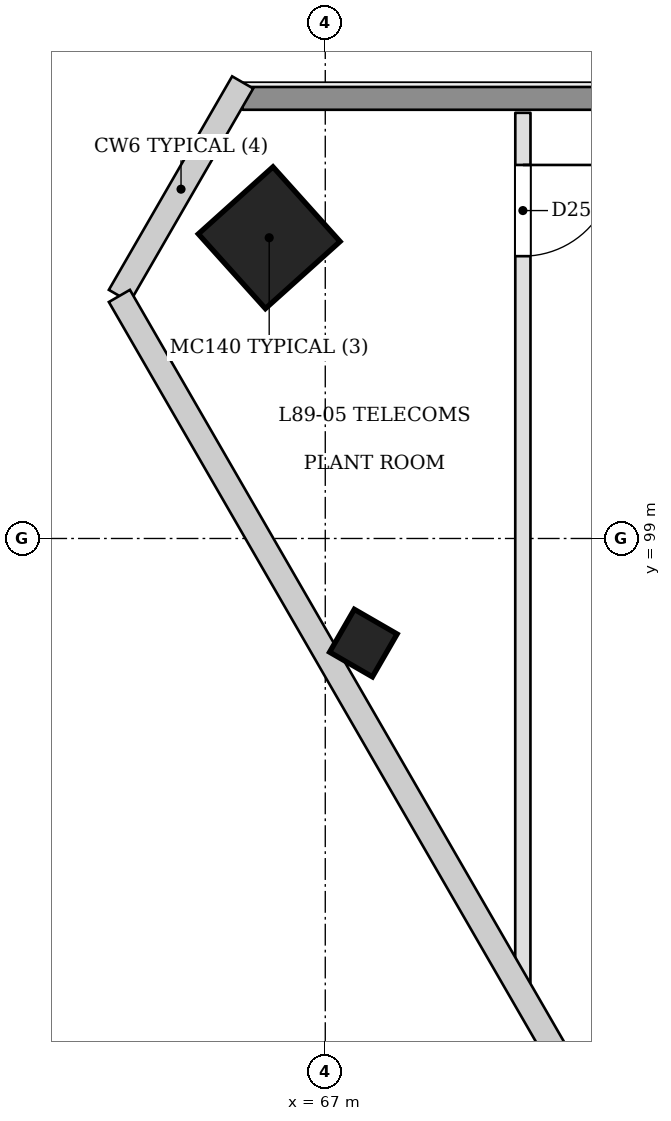
"""IFC4 building model, lengths in metres.
Left out: names, types, materials, properties, quantities, classifications, styles, units other than length and angle.
Written with IfcOpenShell. Run it as: python <this file> out.ifc"""

import sys

from ifc_helpers import new_model, si_unit, direction, frame, frame_2d, origin, origin_2d, place, context, subcontext, project, spatial, rectangle, extrude, element, fill, save


model = new_model("IFC4")
c1 = context("Model", 3, precision=1e-05, world=origin(), true_north=direction((0.0, 1.0)))
c2 = subcontext(c1, "Body", "Model", "MODEL_VIEW")
j1 = project(units=[si_unit("LENGTHUNIT", "METRE"), si_unit("PLANEANGLEUNIT", "RADIAN")], contexts=[c1])
p1 = place(None, origin())
s1 = spatial("IfcSite", under=j1, at=p1, CompositionType="ELEMENT")
p2 = place(p1, origin())
s2 = spatial("IfcBuilding", under=s1, at=p2, CompositionType="ELEMENT")
p3 = place(p2, frame((0.0, 0.0, 343.0)))
s3 = spatial("IfcBuildingStorey", under=s2, at=p3, CompositionType="ELEMENT", Elevation=343.0)
p4 = place(p3, frame((66.228, 102.945, 0.0), z_axis=(0.028354513336, 0.00929656175, 0.99955469861), x_axis=(-0.866606398712, 0.498593533473, 0.019945879045)))
e1 = element("IfcColumn", 1, at=p4, inside=s3, PredefinedType="COLUMN", context=c2, shape_type="SweptSolid", body=[
    extrude(rectangle(XDim=1.32, YDim=1.32, at=origin_2d()), origin(), (0.0, 0.0, 1.0), 4.202),
])
p5 = place(p3, frame((67.475, 97.578, 0.0), z_axis=(0.022183545815, 0.038443736465, 0.999014499105), x_axis=(-0.86548390038, -0.499459809309, 0.038438484201)))
e2 = element("IfcColumn", 2, at=p5, inside=s3, PredefinedType="COLUMN", context=c2, shape_type="SweptSolid", body=[
    extrude(rectangle(XDim=0.65, YDim=0.65, at=origin_2d()), origin(), (0.0, 0.0, 1.0), 4.204),
])
p6 = place(p3, frame((69.6, 104.6, 0.0), z_axis=(0.0, 0.0, 1.0), x_axis=(-8.5347899e-05, -0.999999996358, 0.0)))
e3 = element("IfcWall", 3, at=p6, inside=s3, PredefinedType="PARTITIONING", context=c2, shape_type="SweptSolid", body=[
    extrude(rectangle(XDim=11.442, YDim=0.2, at=frame_2d((5.721, 0.0))), origin(), (0.0, 0.0, 1.0), 3.8),
])
p7 = place(p6, frame((0.686, 0.0, 0.0)))
e4 = element("IfcOpeningElement", 4, at=p7, cuts=e3, PredefinedType="OPENING", context=c2, shape_type="SweptSolid", body=[
    extrude(rectangle(XDim=1.2, YDim=2.4, at=frame_2d((0.6, 1.2))), frame((0.0, 0.11, 0.0), z_axis=(0.0, -1.0, 0.0), x_axis=(1.0, 0.0, 0.0)), (0.0, 0.0, 1.0), 0.221),
])
p8 = place(p3, frame((65.913, 104.79, 0.0), z_axis=(0.0, 0.0, 1.0), x_axis=(1.0, 0.0, 0.0)))
e5 = element("IfcWall", 5, at=p8, inside=s3, PredefinedType="SOLIDWALL", context=c2, shape_type="SweptSolid", body=[
    extrude(rectangle(XDim=38.173, YDim=0.3, at=frame_2d((19.087, 0.0))), origin(), (0.0, 0.0, 1.0), 3.8),
])
p9 = place(p7, origin())
e6 = element("IfcDoor", 6, at=p9, inside=s3, OperationType="SINGLE_SWING_LEFT", PredefinedType="NOTDEFINED", context=c2, shape_type="SweptSolid", body=[
    extrude(rectangle(XDim=1.2, YDim=2.4, at=frame_2d((0.6, 1.2))), frame((0.0, 0.025, 0.0), z_axis=(0.0, -1.0, 0.0), x_axis=(1.0, 0.0, 0.0)), (0.0, 0.0, 1.0), 0.05),
])
fill(e4, e6)
save(model, sys.argv[1])
